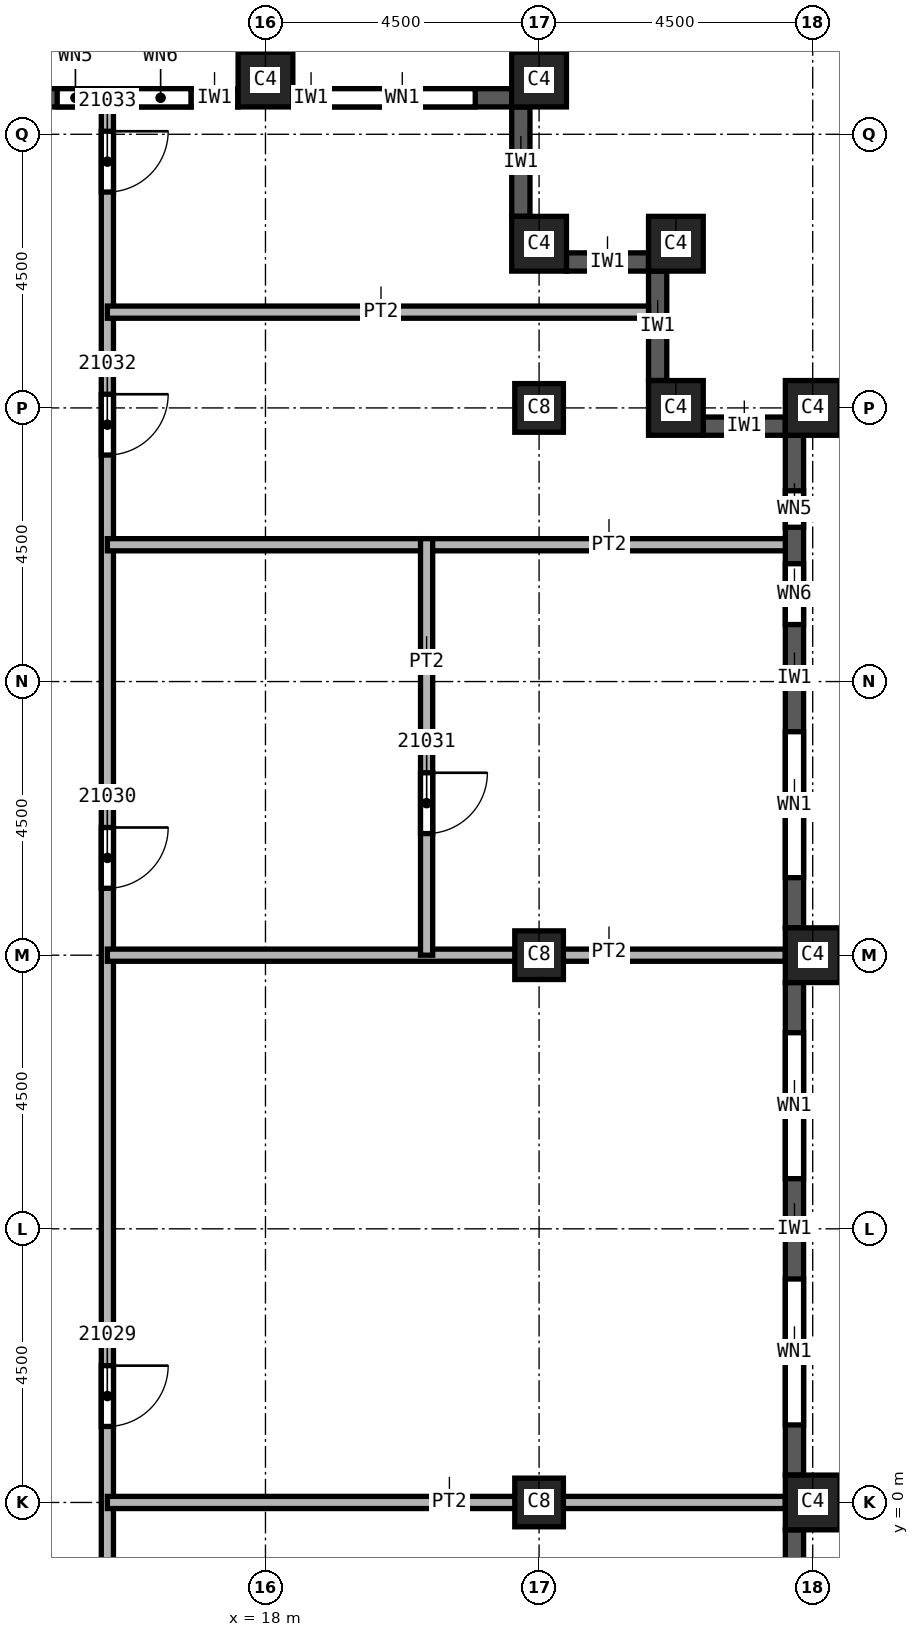
"""IFC4 building model, lengths in metres.
Left out: names, types, materials, properties, quantities, classifications, styles, units other than length and angle.
Written with IfcOpenShell. Run it as: python <this file> out.ifc"""

import sys

from ifc_helpers import new_model, si_unit, direction, frame, frame_2d, origin, origin_2d, place, context, subcontext, project, spatial, rectangle, extrude, element, fill, save


model = new_model("IFC4")
c1 = context("Model", 3, precision=1e-05, world=origin(), true_north=direction((0.0, 1.0)))
c2 = subcontext(c1, "Body", "Model", "MODEL_VIEW")
j1 = project(units=[si_unit("LENGTHUNIT", "METRE"), si_unit("PLANEANGLEUNIT", "RADIAN")], contexts=[c1])
p1 = place(None, origin())
s1 = spatial("IfcSite", under=j1, at=p1, CompositionType="ELEMENT")
p2 = place(p1, origin())
s2 = spatial("IfcBuilding", under=s1, at=p2, CompositionType="ELEMENT")
p3 = place(p2, frame((0.0, 0.0, 304.0)))
s3 = spatial("IfcBuildingStorey", under=s2, at=p3, CompositionType="ELEMENT", Elevation=304.0)
for number, where, z_axis, x_axis in (
    (1, (22.5, 0.0, 0.0), (0.0, 0.0, 1.0), (1.0, 0.0, 0.0)),
    (2, (22.5, 9.0, 0.0), (0.0, 0.0, 1.0), (1.0, 0.0, 0.0)),
    (3, (22.5, 18.0, 0.0), (0.0, 0.0, 1.0), (1.0, 0.0, 0.0)),
):
    element("IfcColumn", number, at=place(p3, frame(where, z_axis=z_axis, x_axis=x_axis)), inside=s3, PredefinedType="COLUMN", context=c2, shape_type="SweptSolid", body=[
        extrude(rectangle(XDim=0.8, YDim=0.8, at=origin_2d()), origin(), (0.0, 0.0, 1.0), 3.74),
    ])
for number, where, z_axis, x_axis in (
    (4, (27.0, 0.0, 0.0), (0.0, 0.0, 1.0), (0.0, 1.0, 0.0)),
    (5, (27.0, 9.0, 0.0), (0.0, 0.0, 1.0), (0.0, 1.0, 0.0)),
    (6, (27.0, 18.0, 0.0), (0.0, 0.0, 1.0), (0.0, 1.0, 0.0)),
    (7, (18.0, 23.4, 0.0), (0.0, 0.0, 1.0), (1.0, 0.0, 0.0)),
    (8, (22.5, 23.4, 0.0), (0.0, 0.0, 1.0), (1.0, 0.0, 0.0)),
    (9, (22.5, 20.7, 0.0), (0.0, 0.0, 1.0), (1.0, 0.0, 0.0)),
    (10, (24.75, 20.7, 0.0), (0.0, 0.0, 1.0), (1.0, 0.0, 0.0)),
    (11, (24.75, 18.0, 0.0), (0.0, 0.0, 1.0), (1.0, 0.0, 0.0)),
):
    element("IfcColumn", number, at=place(p3, frame(where, z_axis=z_axis, x_axis=x_axis)), inside=s3, PredefinedType="COLUMN", context=c2, shape_type="SweptSolid", body=[
        extrude(rectangle(XDim=0.9, YDim=0.9, at=origin_2d()), origin(), (0.0, 0.0, 1.0), 3.74),
    ])
p4 = place(p3, frame((26.7, -8.55, 0.0), z_axis=(0.0, 0.0, 1.0), x_axis=(0.0, 1.0, 0.0)))
e12 = element("IfcWall", 12, at=p4, inside=s3, PredefinedType="SOLIDWALL", context=c2, shape_type="SweptSolid", body=[
    extrude(rectangle(XDim=8.1, YDim=0.3, at=frame_2d((4.05, 0.0))), origin(), (0.0, 0.0, 1.0), 3.14),
])
p5 = place(p4, frame((0.825, 0.0, 0.8)))
e13 = element("IfcOpeningElement", 13, at=p5, cuts=e12, PredefinedType="OPENING", context=c2, shape_type="SweptSolid", body=[
    extrude(rectangle(XDim=2.4, YDim=1.95, at=frame_2d((1.2, 0.975))), frame((0.0, 0.15, 0.0), z_axis=(0.0, -1.0, 0.0), x_axis=(1.0, 0.0, 0.0)), (0.0, 0.0, 1.0), 0.3),
])
p6 = place(p4, frame((4.875, 0.0, 0.8)))
e14 = element("IfcOpeningElement", 14, at=p6, cuts=e12, PredefinedType="OPENING", context=c2, shape_type="SweptSolid", body=[
    extrude(rectangle(XDim=2.4, YDim=1.95, at=frame_2d((1.2, 0.975))), frame((0.0, 0.15, 0.0), z_axis=(0.0, -1.0, 0.0), x_axis=(1.0, 0.0, 0.0)), (0.0, 0.0, 1.0), 0.3),
])
p7 = place(p3, frame((26.7, 0.45, 0.0), z_axis=(0.0, 0.0, 1.0), x_axis=(0.0, 1.0, 0.0)))
e15 = element("IfcWall", 15, at=p7, inside=s3, PredefinedType="SOLIDWALL", context=c2, shape_type="SweptSolid", body=[
    extrude(rectangle(XDim=8.1, YDim=0.3, at=frame_2d((4.05, 0.0))), origin(), (0.0, 0.0, 1.0), 3.14),
])
p8 = place(p7, frame((0.825, 0.0, 0.8)))
e16 = element("IfcOpeningElement", 16, at=p8, cuts=e15, PredefinedType="OPENING", context=c2, shape_type="SweptSolid", body=[
    extrude(rectangle(XDim=2.4, YDim=1.95, at=frame_2d((1.2, 0.975))), frame((0.0, 0.15, 0.0), z_axis=(0.0, -1.0, 0.0), x_axis=(1.0, 0.0, 0.0)), (0.0, 0.0, 1.0), 0.3),
])
p9 = place(p7, frame((4.875, 0.0, 0.8)))
e17 = element("IfcOpeningElement", 17, at=p9, cuts=e15, PredefinedType="OPENING", context=c2, shape_type="SweptSolid", body=[
    extrude(rectangle(XDim=2.4, YDim=1.95, at=frame_2d((1.2, 0.975))), frame((0.0, 0.15, 0.0), z_axis=(0.0, -1.0, 0.0), x_axis=(1.0, 0.0, 0.0)), (0.0, 0.0, 1.0), 0.3),
])
p10 = place(p3, frame((26.7, 9.45, 0.0), z_axis=(0.0, 0.0, 1.0), x_axis=(0.0, 1.0, 0.0)))
e18 = element("IfcWall", 18, at=p10, inside=s3, PredefinedType="SOLIDWALL", context=c2, shape_type="SweptSolid", body=[
    extrude(rectangle(XDim=8.1, YDim=0.3, at=frame_2d((4.05, 0.0))), origin(), (0.0, 0.0, 1.0), 3.14),
])
p11 = place(p10, frame((0.825, 0.0, 0.8)))
e19 = element("IfcOpeningElement", 19, at=p11, cuts=e18, PredefinedType="OPENING", context=c2, shape_type="SweptSolid", body=[
    extrude(rectangle(XDim=2.4, YDim=1.95, at=frame_2d((1.2, 0.975))), frame((0.0, 0.15, 0.0), z_axis=(0.0, -1.0, 0.0), x_axis=(1.0, 0.0, 0.0)), (0.0, 0.0, 1.0), 0.3),
])
p12 = place(p10, frame((4.988, 0.0, 0.8)))
e20 = element("IfcOpeningElement", 20, at=p12, cuts=e18, PredefinedType="OPENING", context=c2, shape_type="SweptSolid", body=[
    extrude(rectangle(XDim=1.0, YDim=1.95, at=frame_2d((0.5, 0.975))), frame((0.0, 0.15, 0.0), z_axis=(0.0, -1.0, 0.0), x_axis=(1.0, 0.0, 0.0)), (0.0, 0.0, 1.0), 0.3),
])
p13 = place(p10, frame((6.587, 0.0, 0.8)))
e21 = element("IfcOpeningElement", 21, at=p13, cuts=e18, PredefinedType="OPENING", context=c2, shape_type="SweptSolid", body=[
    extrude(rectangle(XDim=0.6, YDim=1.95, at=frame_2d((0.3, 0.975))), frame((0.0, 0.15, 0.0), z_axis=(0.0, -1.0, 0.0), x_axis=(1.0, 0.0, 0.0)), (0.0, 0.0, 1.0), 0.3),
])
p14 = place(p3, frame((26.55, 17.7, 0.0), z_axis=(0.0, 0.0, 1.0), x_axis=(-1.0, 0.0, 0.0)))
e22 = element("IfcWall", 22, at=p14, inside=s3, PredefinedType="SOLIDWALL", context=c2, shape_type="SweptSolid", body=[
    extrude(rectangle(XDim=1.35, YDim=0.3, at=frame_2d((0.675, 0.0))), origin(), (0.0, 0.0, 1.0), 3.14),
])
p15 = place(p3, frame((24.45, 18.45, 0.0), z_axis=(0.0, 0.0, 1.0), x_axis=(0.0, 1.0, 0.0)))
e23 = element("IfcWall", 23, at=p15, inside=s3, PredefinedType="SOLIDWALL", context=c2, shape_type="SweptSolid", body=[
    extrude(rectangle(XDim=1.8, YDim=0.3, at=frame_2d((0.9, 0.0))), origin(), (0.0, 0.0, 1.0), 3.14),
])
p16 = place(p3, frame((24.3, 20.4, 0.0), z_axis=(0.0, 0.0, 1.0), x_axis=(-1.0, 0.0, 0.0)))
e24 = element("IfcWall", 24, at=p16, inside=s3, PredefinedType="SOLIDWALL", context=c2, shape_type="SweptSolid", body=[
    extrude(rectangle(XDim=1.35, YDim=0.3, at=frame_2d((0.675, 0.0))), origin(), (0.0, 0.0, 1.0), 3.14),
])
p17 = place(p3, frame((22.2, 21.15, 0.0), z_axis=(0.0, 0.0, 1.0), x_axis=(0.0, 1.0, 0.0)))
e25 = element("IfcWall", 25, at=p17, inside=s3, PredefinedType="SOLIDWALL", context=c2, shape_type="SweptSolid", body=[
    extrude(rectangle(XDim=1.8, YDim=0.3, at=frame_2d((0.9, 0.0))), origin(), (0.0, 0.0, 1.0), 3.14),
])
p18 = place(p3, frame((22.05, 23.1, 0.0), z_axis=(0.0, 0.0, 1.0), x_axis=(-1.0, 0.0, 0.0)))
e26 = element("IfcWall", 26, at=p18, inside=s3, PredefinedType="SOLIDWALL", context=c2, shape_type="SweptSolid", body=[
    extrude(rectangle(XDim=3.6, YDim=0.3, at=frame_2d((1.8, 0.0))), origin(), (0.0, 0.0, 1.0), 3.14),
])
p19 = place(p18, frame((0.6, 0.0, 0.8)))
e27 = element("IfcOpeningElement", 27, at=p19, cuts=e26, PredefinedType="OPENING", context=c2, shape_type="SweptSolid", body=[
    extrude(rectangle(XDim=2.4, YDim=1.95, at=frame_2d((1.2, 0.975))), frame((0.0, 0.15, 0.0), z_axis=(0.0, -1.0, 0.0), x_axis=(1.0, 0.0, 0.0)), (0.0, 0.0, 1.0), 0.3),
])
p20 = place(p3, frame((17.55, 23.1, 0.0), z_axis=(0.0, 0.0, 1.0), x_axis=(-1.0, 0.0, 0.0)))
e28 = element("IfcWall", 28, at=p20, inside=s3, PredefinedType="SOLIDWALL", context=c2, shape_type="SweptSolid", body=[
    extrude(rectangle(XDim=3.6, YDim=0.3, at=frame_2d((1.8, 0.0))), origin(), (0.0, 0.0, 1.0), 3.14),
])
p21 = place(p20, frame((0.775, 0.0, 0.8)))
e29 = element("IfcOpeningElement", 29, at=p21, cuts=e28, PredefinedType="OPENING", context=c2, shape_type="SweptSolid", body=[
    extrude(rectangle(XDim=1.0, YDim=1.95, at=frame_2d((0.5, 0.975))), frame((0.0, 0.15, 0.0), z_axis=(0.0, -1.0, 0.0), x_axis=(1.0, 0.0, 0.0)), (0.0, 0.0, 1.0), 0.3),
])
p22 = place(p20, frame((2.375, 0.0, 0.8)))
e30 = element("IfcOpeningElement", 30, at=p22, cuts=e28, PredefinedType="OPENING", context=c2, shape_type="SweptSolid", body=[
    extrude(rectangle(XDim=0.6, YDim=1.95, at=frame_2d((0.3, 0.975))), frame((0.0, 0.15, 0.0), z_axis=(0.0, -1.0, 0.0), x_axis=(1.0, 0.0, 0.0)), (0.0, 0.0, 1.0), 0.3),
])
p23 = place(p3, frame((15.4, 22.95, 0.0), z_axis=(0.0, 0.0, 1.0), x_axis=(0.0, -1.0, 0.0)))
e31 = element("IfcWall", 31, at=p23, inside=s3, PredefinedType="PARTITIONING", context=c2, shape_type="SweptSolid", body=[
    extrude(rectangle(XDim=45.9, YDim=0.2, at=frame_2d((22.95, 0.0))), origin(), (0.0, 0.0, 1.0), 3.74),
])
p24 = place(p23, frame((20.7, 0.0, 0.0)))
e32 = element("IfcOpeningElement", 32, at=p24, cuts=e31, PredefinedType="OPENING", context=c2, shape_type="SweptSolid", body=[
    extrude(rectangle(XDim=1.0, YDim=2.1, at=frame_2d((0.5, 1.05))), frame((0.0, 0.1, 0.0), z_axis=(0.0, -1.0, 0.0), x_axis=(1.0, 0.0, 0.0)), (0.0, 0.0, 1.0), 0.2),
])
p25 = place(p23, frame((11.85, 0.0, 0.0)))
e33 = element("IfcOpeningElement", 33, at=p25, cuts=e31, PredefinedType="OPENING", context=c2, shape_type="SweptSolid", body=[
    extrude(rectangle(XDim=1.0, YDim=2.1, at=frame_2d((0.5, 1.05))), frame((0.0, 0.1, 0.0), z_axis=(0.0, -1.0, 0.0), x_axis=(1.0, 0.0, 0.0)), (0.0, 0.0, 1.0), 0.2),
])
p26 = place(p23, frame((4.725, 0.0, 0.0)))
e34 = element("IfcOpeningElement", 34, at=p26, cuts=e31, PredefinedType="OPENING", context=c2, shape_type="SweptSolid", body=[
    extrude(rectangle(XDim=1.0, YDim=2.1, at=frame_2d((0.5, 1.05))), frame((0.0, 0.1, 0.0), z_axis=(0.0, -1.0, 0.0), x_axis=(1.0, 0.0, 0.0)), (0.0, 0.0, 1.0), 0.2),
])
p27 = place(p23, frame((0.4, 0.0, 0.0)))
e35 = element("IfcOpeningElement", 35, at=p27, cuts=e31, PredefinedType="OPENING", context=c2, shape_type="SweptSolid", body=[
    extrude(rectangle(XDim=1.0, YDim=2.1, at=frame_2d((0.5, 1.05))), frame((0.0, 0.1, 0.0), z_axis=(0.0, -1.0, 0.0), x_axis=(1.0, 0.0, 0.0)), (0.0, 0.0, 1.0), 0.2),
])
p28 = place(p23, frame((38.85, 0.0, 0.0)))
e36 = element("IfcOpeningElement", 36, at=p28, cuts=e31, PredefinedType="OPENING", context=c2, shape_type="SweptSolid", body=[
    extrude(rectangle(XDim=1.0, YDim=2.1, at=frame_2d((0.5, 1.05))), frame((0.0, 0.1, 0.0), z_axis=(0.0, -1.0, 0.0), x_axis=(1.0, 0.0, 0.0)), (0.0, 0.0, 1.0), 0.2),
])
p29 = place(p23, frame((26.55, 0.0, 0.0)))
e37 = element("IfcOpeningElement", 37, at=p29, cuts=e31, PredefinedType="OPENING", context=c2, shape_type="SweptSolid", body=[
    extrude(rectangle(XDim=1.0, YDim=2.1, at=frame_2d((0.5, 1.05))), frame((0.0, 0.1, 0.0), z_axis=(0.0, -1.0, 0.0), x_axis=(1.0, 0.0, 0.0)), (0.0, 0.0, 1.0), 0.2),
])
for number, where, z_axis, x_axis in (
    (38, (15.4, 9.0, 0.0), (0.0, 0.0, 1.0), (1.0, 0.0, 0.0)),
    (39, (15.4, 15.75, 0.0), (0.0, 0.0, 1.0), (1.0, 0.0, 0.0)),
):
    element("IfcWall", number, at=place(p3, frame(where, z_axis=z_axis, x_axis=x_axis)), inside=s3, PredefinedType="PARTITIONING", context=c2, shape_type="SweptSolid", body=[
        extrude(rectangle(XDim=11.15, YDim=0.2, at=frame_2d((5.575, 0.0))), origin(), (0.0, 0.0, 1.0), 3.74),
    ])
p30 = place(p3, frame((15.4, 19.575, 0.0), z_axis=(0.0, 0.0, 1.0), x_axis=(1.0, 0.0, 0.0)))
e40 = element("IfcWall", 40, at=p30, inside=s3, PredefinedType="PARTITIONING", context=c2, shape_type="SweptSolid", body=[
    extrude(rectangle(XDim=8.9, YDim=0.2, at=frame_2d((4.45, 0.0))), origin(), (0.0, 0.0, 1.0), 3.74),
])
p31 = place(p3, frame((20.65, 15.85, 0.0), z_axis=(0.0, 0.0, 1.0), x_axis=(0.0, -1.0, 0.0)))
e41 = element("IfcWall", 41, at=p31, inside=s3, PredefinedType="PARTITIONING", context=c2, shape_type="SweptSolid", body=[
    extrude(rectangle(XDim=6.85, YDim=0.2, at=frame_2d((3.425, 0.0))), origin(), (0.0, 0.0, 1.0), 3.74),
])
p32 = place(p31, frame((3.85, 0.0, 0.0)))
e42 = element("IfcOpeningElement", 42, at=p32, cuts=e41, PredefinedType="OPENING", context=c2, shape_type="SweptSolid", body=[
    extrude(rectangle(XDim=1.0, YDim=2.1, at=frame_2d((0.5, 1.05))), frame((0.0, 0.1, 0.0), z_axis=(0.0, -1.0, 0.0), x_axis=(1.0, 0.0, 0.0)), (0.0, 0.0, 1.0), 0.2),
])
p33 = place(p3, frame((26.55, 0.0, 0.0), z_axis=(0.0, 0.0, 1.0), x_axis=(-1.0, 0.0, 0.0)))
e43 = element("IfcWall", 43, at=p33, inside=s3, PredefinedType="PARTITIONING", context=c2, shape_type="SweptSolid", body=[
    extrude(rectangle(XDim=11.15, YDim=0.2, at=frame_2d((5.575, 0.0))), origin(), (0.0, 0.0, 1.0), 3.74),
])
p34 = place(p8, origin())
e44 = element("IfcWindow", 44, at=p34, inside=s3, PartitioningType="SINGLE_PANEL", PredefinedType="WINDOW", context=c2, shape_type="SweptSolid", body=[
    extrude(rectangle(XDim=2.4, YDim=1.95, at=frame_2d((1.2, 0.975))), frame((0.0, 0.03, 0.0), z_axis=(0.0, -1.0, 0.0), x_axis=(1.0, 0.0, 0.0)), (0.0, 0.0, 1.0), 0.06),
])
fill(e16, e44)
p35 = place(p9, origin())
e45 = element("IfcWindow", 45, at=p35, inside=s3, PartitioningType="SINGLE_PANEL", PredefinedType="WINDOW", context=c2, shape_type="SweptSolid", body=[
    extrude(rectangle(XDim=2.4, YDim=1.95, at=frame_2d((1.2, 0.975))), frame((0.0, 0.03, 0.0), z_axis=(0.0, -1.0, 0.0), x_axis=(1.0, 0.0, 0.0)), (0.0, 0.0, 1.0), 0.06),
])
fill(e17, e45)
p36 = place(p11, origin())
e46 = element("IfcWindow", 46, at=p36, inside=s3, PartitioningType="SINGLE_PANEL", PredefinedType="WINDOW", context=c2, shape_type="SweptSolid", body=[
    extrude(rectangle(XDim=2.4, YDim=1.95, at=frame_2d((1.2, 0.975))), frame((0.0, 0.03, 0.0), z_axis=(0.0, -1.0, 0.0), x_axis=(1.0, 0.0, 0.0)), (0.0, 0.0, 1.0), 0.06),
])
fill(e19, e46)
p37 = place(p19, origin())
e47 = element("IfcWindow", 47, at=p37, inside=s3, PartitioningType="SINGLE_PANEL", PredefinedType="WINDOW", context=c2, shape_type="SweptSolid", body=[
    extrude(rectangle(XDim=2.4, YDim=1.95, at=frame_2d((1.2, 0.975))), frame((0.0, 0.03, 0.0), z_axis=(0.0, -1.0, 0.0), x_axis=(1.0, 0.0, 0.0)), (0.0, 0.0, 1.0), 0.06),
])
fill(e27, e47)
p38 = place(p24, origin())
e48 = element("IfcDoor", 48, at=p38, inside=s3, OperationType="SINGLE_SWING_RIGHT", PredefinedType="DOOR", context=c2, shape_type="SweptSolid", body=[
    extrude(rectangle(XDim=1.0, YDim=2.1, at=frame_2d((0.5, 1.05))), frame((0.0, 0.025, 0.0), z_axis=(0.0, -1.0, 0.0), x_axis=(1.0, 0.0, 0.0)), (0.0, 0.0, 1.0), 0.05),
])
fill(e32, e48)
p39 = place(p25, origin())
e49 = element("IfcDoor", 49, at=p39, inside=s3, OperationType="SINGLE_SWING_LEFT", PredefinedType="DOOR", context=c2, shape_type="SweptSolid", body=[
    extrude(rectangle(XDim=1.0, YDim=2.1, at=frame_2d((0.5, 1.05))), frame((0.0, 0.025, 0.0), z_axis=(0.0, -1.0, 0.0), x_axis=(1.0, 0.0, 0.0)), (0.0, 0.0, 1.0), 0.05),
])
fill(e33, e49)
p40 = place(p32, origin())
e50 = element("IfcDoor", 50, at=p40, inside=s3, OperationType="SINGLE_SWING_RIGHT", PredefinedType="DOOR", context=c2, shape_type="SweptSolid", body=[
    extrude(rectangle(XDim=1.0, YDim=2.1, at=frame_2d((0.5, 1.05))), frame((0.0, 0.025, 0.0), z_axis=(0.0, -1.0, 0.0), x_axis=(1.0, 0.0, 0.0)), (0.0, 0.0, 1.0), 0.05),
])
fill(e42, e50)
p41 = place(p26, origin())
e51 = element("IfcDoor", 51, at=p41, inside=s3, OperationType="SINGLE_SWING_LEFT", PredefinedType="DOOR", context=c2, shape_type="SweptSolid", body=[
    extrude(rectangle(XDim=1.0, YDim=2.1, at=frame_2d((0.5, 1.05))), frame((0.0, 0.025, 0.0), z_axis=(0.0, -1.0, 0.0), x_axis=(1.0, 0.0, 0.0)), (0.0, 0.0, 1.0), 0.05),
])
fill(e34, e51)
p42 = place(p27, origin())
e52 = element("IfcDoor", 52, at=p42, inside=s3, OperationType="SINGLE_SWING_RIGHT", PredefinedType="DOOR", context=c2, shape_type="SweptSolid", body=[
    extrude(rectangle(XDim=1.0, YDim=2.1, at=frame_2d((0.5, 1.05))), frame((0.0, 0.025, 0.0), z_axis=(0.0, -1.0, 0.0), x_axis=(1.0, 0.0, 0.0)), (0.0, 0.0, 1.0), 0.05),
])
fill(e35, e52)
p43 = place(p12, origin())
e53 = element("IfcWindow", 53, at=p43, inside=s3, PartitioningType="SINGLE_PANEL", PredefinedType="WINDOW", context=c2, shape_type="SweptSolid", body=[
    extrude(rectangle(XDim=1.0, YDim=1.95, at=frame_2d((0.5, 0.975))), frame((0.0, 0.03, 0.0), z_axis=(0.0, -1.0, 0.0), x_axis=(1.0, 0.0, 0.0)), (0.0, 0.0, 1.0), 0.06),
])
fill(e20, e53)
p44 = place(p13, origin())
e54 = element("IfcWindow", 54, at=p44, inside=s3, PartitioningType="SINGLE_PANEL", PredefinedType="WINDOW", context=c2, shape_type="SweptSolid", body=[
    extrude(rectangle(XDim=0.6, YDim=1.95, at=frame_2d((0.3, 0.975))), frame((0.0, 0.03, 0.0), z_axis=(0.0, -1.0, 0.0), x_axis=(1.0, 0.0, 0.0)), (0.0, 0.0, 1.0), 0.06),
])
fill(e21, e54)
p45 = place(p21, origin())
e55 = element("IfcWindow", 55, at=p45, inside=s3, PartitioningType="SINGLE_PANEL", PredefinedType="WINDOW", context=c2, shape_type="SweptSolid", body=[
    extrude(rectangle(XDim=1.0, YDim=1.95, at=frame_2d((0.5, 0.975))), frame((0.0, 0.03, 0.0), z_axis=(0.0, -1.0, 0.0), x_axis=(1.0, 0.0, 0.0)), (0.0, 0.0, 1.0), 0.06),
])
fill(e29, e55)
p46 = place(p22, origin())
e56 = element("IfcWindow", 56, at=p46, inside=s3, PartitioningType="SINGLE_PANEL", PredefinedType="WINDOW", context=c2, shape_type="SweptSolid", body=[
    extrude(rectangle(XDim=0.6, YDim=1.95, at=frame_2d((0.3, 0.975))), frame((0.0, 0.03, 0.0), z_axis=(0.0, -1.0, 0.0), x_axis=(1.0, 0.0, 0.0)), (0.0, 0.0, 1.0), 0.06),
])
fill(e30, e56)
save(model, sys.argv[1])
